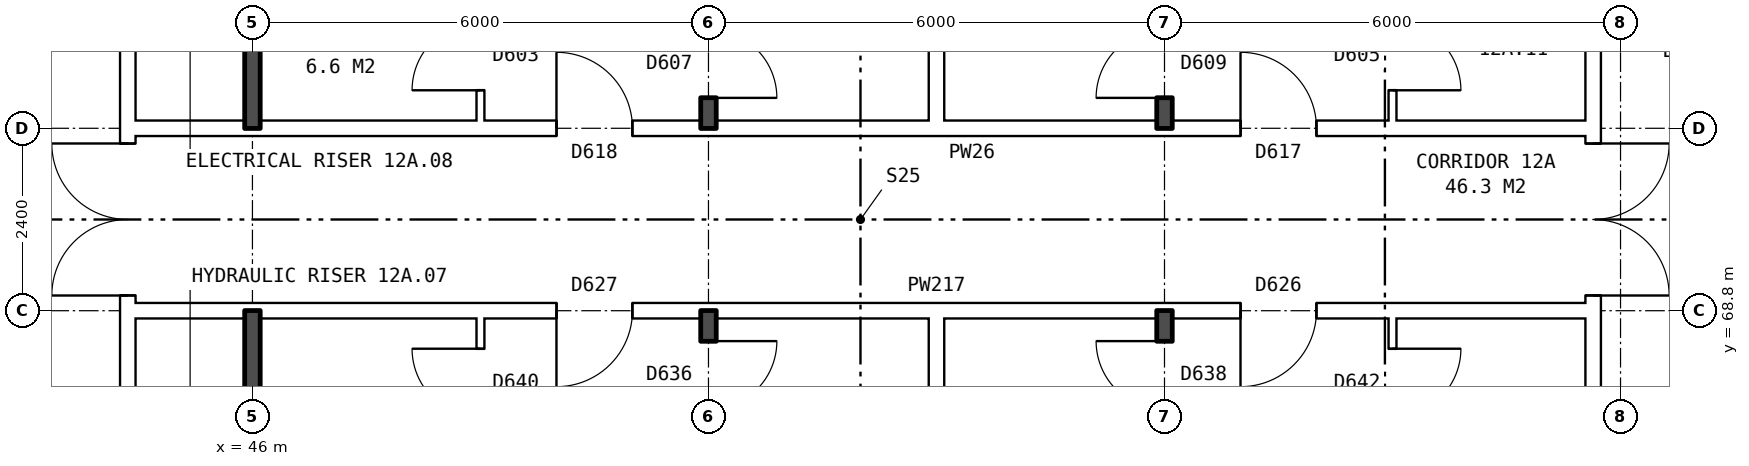
"""IFC4 building model, lengths in metres.
Left out: names, types, materials, properties, quantities, classifications, styles, units other than length and angle.
Written with IfcOpenShell. Run it as: python <this file> out.ifc"""

import sys

from ifc_helpers import new_model, si_unit, direction, frame, frame_2d, origin, place, context, subcontext, project, spatial, rectangle, extrude, element, fill, save


model = new_model("IFC4")
c1 = context("Model", 3, precision=1e-05, world=origin(), true_north=direction((0.0, 1.0)))
c2 = subcontext(c1, "Body", "Model", "MODEL_VIEW")
j1 = project(units=[si_unit("LENGTHUNIT", "METRE"), si_unit("PLANEANGLEUNIT", "RADIAN")], contexts=[c1])
p1 = place(None, origin())
s1 = spatial("IfcSite", under=j1, at=p1, CompositionType="ELEMENT")
p2 = place(p1, origin())
s2 = spatial("IfcBuilding", under=s1, at=p2, CompositionType="ELEMENT")
p3 = place(p2, frame((0.0, 0.0, 47.4)))
s3 = spatial("IfcBuildingStorey", under=s2, at=p3, CompositionType="ELEMENT", Elevation=47.4)
p4 = place(p3, frame((63.64, 63.9, 0.0), z_axis=(0.0, 0.0, 1.0), x_axis=(0.0, 1.0, 0.0)))
e1 = element("IfcWall", 1, at=p4, inside=s3, PredefinedType="PARTITIONING", context=c2, shape_type="SweptSolid", body=[
    extrude(rectangle(XDim=12.2, YDim=0.2, at=frame_2d((6.1, 0.0))), origin(), (0.0, 0.0, 1.0), 2.85),
])
p5 = place(p4, frame((5.1, 0.0, 0.0)))
e2 = element("IfcOpeningElement", 2, at=p5, cuts=e1, PredefinedType="OPENING", context=c2, shape_type="SweptSolid", body=[
    extrude(rectangle(XDim=2.0, YDim=2.1, at=frame_2d((1.0, 1.05))), frame((0.0, 0.11, 0.0), z_axis=(0.0, -1.0, 0.0), x_axis=(1.0, 0.0, 0.0)), (0.0, 0.0, 1.0), 0.22),
])
p6 = place(p3, frame((44.36, 63.9, 0.0), z_axis=(0.0, 0.0, 1.0), x_axis=(0.0, 1.0, 0.0)))
e3 = element("IfcWall", 3, at=p6, inside=s3, PredefinedType="PARTITIONING", context=c2, shape_type="SweptSolid", body=[
    extrude(rectangle(XDim=12.2, YDim=0.2, at=frame_2d((6.1, 0.0))), origin(), (0.0, 0.0, 1.0), 2.85),
])
p7 = place(p6, frame((5.1, 0.0, 0.0)))
e4 = element("IfcOpeningElement", 4, at=p7, cuts=e3, PredefinedType="OPENING", context=c2, shape_type="SweptSolid", body=[
    extrude(rectangle(XDim=2.0, YDim=2.1, at=frame_2d((1.0, 1.05))), frame((0.0, 0.11, 0.0), z_axis=(0.0, -1.0, 0.0), x_axis=(1.0, 0.0, 0.0)), (0.0, 0.0, 1.0), 0.22),
])
p8 = place(p3, frame((44.36, 68.8, 0.0), z_axis=(0.0, 0.0, 1.0), x_axis=(1.0, 0.0, 0.0)))
e5 = element("IfcWall", 5, at=p8, inside=s3, PredefinedType="PARTITIONING", context=c2, shape_type="SweptSolid", body=[
    extrude(rectangle(XDim=19.28, YDim=0.2, at=frame_2d((9.64, 0.0))), origin(), (0.0, 0.0, 1.0), 2.85),
])
p9 = place(p8, frame((14.64, 0.0, 0.0)))
e6 = element("IfcOpeningElement", 6, at=p9, cuts=e5, PredefinedType="OPENING", context=c2, shape_type="SweptSolid", body=[
    extrude(rectangle(XDim=1.0, YDim=2.1, at=frame_2d((0.5, 1.05))), frame((0.0, 0.11, 0.0), z_axis=(0.0, -1.0, 0.0), x_axis=(1.0, 0.0, 0.0)), (0.0, 0.0, 1.0), 0.22),
])
p10 = place(p8, frame((5.64, 0.0, 0.0)))
e7 = element("IfcOpeningElement", 7, at=p10, cuts=e5, PredefinedType="OPENING", context=c2, shape_type="SweptSolid", body=[
    extrude(rectangle(XDim=1.0, YDim=2.1, at=frame_2d((0.5, 1.05))), frame((0.0, 0.11, 0.0), z_axis=(0.0, -1.0, 0.0), x_axis=(1.0, 0.0, 0.0)), (0.0, 0.0, 1.0), 0.22),
])
p11 = place(p3, frame((44.36, 71.2, 0.0), z_axis=(0.0, 0.0, 1.0), x_axis=(1.0, 0.0, 0.0)))
e8 = element("IfcWall", 8, at=p11, inside=s3, PredefinedType="PARTITIONING", context=c2, shape_type="SweptSolid", body=[
    extrude(rectangle(XDim=19.28, YDim=0.2, at=frame_2d((9.64, 0.0))), origin(), (0.0, 0.0, 1.0), 2.85),
])
p12 = place(p11, frame((14.64, 0.0, 0.0)))
e9 = element("IfcOpeningElement", 9, at=p12, cuts=e8, PredefinedType="OPENING", context=c2, shape_type="SweptSolid", body=[
    extrude(rectangle(XDim=1.0, YDim=2.1, at=frame_2d((0.5, 1.05))), frame((0.0, 0.11, 0.0), z_axis=(0.0, -1.0, 0.0), x_axis=(1.0, 0.0, 0.0)), (0.0, 0.0, 1.0), 0.22),
])
p13 = place(p11, frame((5.64, 0.0, 0.0)))
e10 = element("IfcOpeningElement", 10, at=p13, cuts=e8, PredefinedType="OPENING", context=c2, shape_type="SweptSolid", body=[
    extrude(rectangle(XDim=1.0, YDim=2.1, at=frame_2d((0.5, 1.05))), frame((0.0, 0.11, 0.0), z_axis=(0.0, -1.0, 0.0), x_axis=(1.0, 0.0, 0.0)), (0.0, 0.0, 1.0), 0.22),
])
for number, where, z_axis, x_axis in (
    (11, (46.0, 63.8, 0.0), (0.0, 0.0, 1.0), (0.0, 1.0, 0.0)),
    (12, (46.0, 71.2, 0.0), (0.0, 0.0, 1.0), (0.0, 1.0, 0.0)),
):
    element("IfcWall", number, at=place(p3, frame(where, z_axis=z_axis, x_axis=x_axis)), inside=s3, PredefinedType="SOLIDWALL", context=c2, shape_type="SweptSolid", body=[
        extrude(rectangle(XDim=5.0, YDim=0.2, at=frame_2d((2.5, 0.0))), origin(), (0.0, 0.0, 1.0), 2.85),
    ])
p14 = place(p3, frame((49.0, 54.36, 0.0), z_axis=(0.0, 0.0, 1.0), x_axis=(0.0, 1.0, 0.0)))
e13 = element("IfcWall", 13, at=p14, inside=s3, PredefinedType="PARTITIONING", context=c2, shape_type="SweptSolid", body=[
    extrude(rectangle(XDim=14.34, YDim=0.1, at=frame_2d((7.17, 0.0))), origin(), (0.0, 0.0, 1.0), 2.85),
])
p15 = place(p14, frame((6.7, 0.0, 0.0)))
e14 = element("IfcOpeningElement", 14, at=p15, cuts=e13, PredefinedType="OPENING", context=c2, shape_type="SweptSolid", body=[
    extrude(rectangle(XDim=0.9, YDim=2.1, at=frame_2d((0.45, 1.05))), frame((0.0, 0.06, 0.0), z_axis=(0.0, -1.0, 0.0), x_axis=(1.0, 0.0, 0.0)), (0.0, 0.0, 1.0), 0.12),
])
p16 = place(p14, frame((13.04, 0.0, 0.0)))
e15 = element("IfcOpeningElement", 15, at=p16, cuts=e13, PredefinedType="OPENING", context=c2, shape_type="SweptSolid", body=[
    extrude(rectangle(XDim=0.9, YDim=2.1, at=frame_2d((0.45, 1.05))), frame((0.0, 0.06, 0.0), z_axis=(0.0, -1.0, 0.0), x_axis=(1.0, 0.0, 0.0)), (0.0, 0.0, 1.0), 0.12),
])
p17 = place(p3, frame((49.0, 71.3, 0.0), z_axis=(0.0, 0.0, 1.0), x_axis=(0.0, 1.0, 0.0)))
e16 = element("IfcWall", 16, at=p17, inside=s3, PredefinedType="PARTITIONING", context=c2, shape_type="SweptSolid", body=[
    extrude(rectangle(XDim=14.34, YDim=0.1, at=frame_2d((7.17, 0.0))), origin(), (0.0, 0.0, 1.0), 2.85),
])
p18 = place(p17, frame((6.74, 0.0, 0.0)))
e17 = element("IfcOpeningElement", 17, at=p18, cuts=e16, PredefinedType="OPENING", context=c2, shape_type="SweptSolid", body=[
    extrude(rectangle(XDim=0.9, YDim=2.1, at=frame_2d((0.45, 1.05))), frame((0.0, 0.06, 0.0), z_axis=(0.0, -1.0, 0.0), x_axis=(1.0, 0.0, 0.0)), (0.0, 0.0, 1.0), 0.12),
])
p19 = place(p17, frame((0.4, 0.0, 0.0)))
e18 = element("IfcOpeningElement", 18, at=p19, cuts=e16, PredefinedType="OPENING", context=c2, shape_type="SweptSolid", body=[
    extrude(rectangle(XDim=0.9, YDim=2.1, at=frame_2d((0.45, 1.05))), frame((0.0, 0.06, 0.0), z_axis=(0.0, -1.0, 0.0), x_axis=(1.0, 0.0, 0.0)), (0.0, 0.0, 1.0), 0.12),
])
p20 = place(p3, frame((52.0, 54.36, 0.0), z_axis=(0.0, 0.0, 1.0), x_axis=(0.0, 1.0, 0.0)))
e19 = element("IfcWall", 19, at=p20, inside=s3, PredefinedType="SOLIDWALL", context=c2, shape_type="SweptSolid", body=[
    extrude(rectangle(XDim=14.44, YDim=0.2, at=frame_2d((7.22, 0.0))), origin(), (0.0, 0.0, 1.0), 2.85),
])
p21 = place(p20, frame((6.7, 0.0, 0.0)))
e20 = element("IfcOpeningElement", 20, at=p21, cuts=e19, PredefinedType="OPENING", context=c2, shape_type="SweptSolid", body=[
    extrude(rectangle(XDim=0.9, YDim=2.1, at=frame_2d((0.45, 1.05))), frame((0.0, 0.11, 0.0), z_axis=(0.0, -1.0, 0.0), x_axis=(1.0, 0.0, 0.0)), (0.0, 0.0, 1.0), 0.22),
])
p22 = place(p20, frame((13.14, 0.0, 0.0)))
e21 = element("IfcOpeningElement", 21, at=p22, cuts=e19, PredefinedType="OPENING", context=c2, shape_type="SweptSolid", body=[
    extrude(rectangle(XDim=0.9, YDim=2.1, at=frame_2d((0.45, 1.05))), frame((0.0, 0.11, 0.0), z_axis=(0.0, -1.0, 0.0), x_axis=(1.0, 0.0, 0.0)), (0.0, 0.0, 1.0), 0.22),
])
p23 = place(p3, frame((52.0, 71.2, 0.0), z_axis=(0.0, 0.0, 1.0), x_axis=(0.0, 1.0, 0.0)))
e22 = element("IfcWall", 22, at=p23, inside=s3, PredefinedType="SOLIDWALL", context=c2, shape_type="SweptSolid", body=[
    extrude(rectangle(XDim=14.44, YDim=0.2, at=frame_2d((7.22, 0.0))), origin(), (0.0, 0.0, 1.0), 2.85),
])
p24 = place(p23, frame((6.84, 0.0, 0.0)))
e23 = element("IfcOpeningElement", 23, at=p24, cuts=e22, PredefinedType="OPENING", context=c2, shape_type="SweptSolid", body=[
    extrude(rectangle(XDim=0.9, YDim=2.1, at=frame_2d((0.45, 1.05))), frame((0.0, 0.11, 0.0), z_axis=(0.0, -1.0, 0.0), x_axis=(1.0, 0.0, 0.0)), (0.0, 0.0, 1.0), 0.22),
])
p25 = place(p23, frame((0.4, 0.0, 0.0)))
e24 = element("IfcOpeningElement", 24, at=p25, cuts=e22, PredefinedType="OPENING", context=c2, shape_type="SweptSolid", body=[
    extrude(rectangle(XDim=0.9, YDim=2.1, at=frame_2d((0.45, 1.05))), frame((0.0, 0.11, 0.0), z_axis=(0.0, -1.0, 0.0), x_axis=(1.0, 0.0, 0.0)), (0.0, 0.0, 1.0), 0.22),
])
for number, where, z_axis, x_axis in (
    (25, (55.0, 54.36, 0.0), (0.0, 0.0, 1.0), (0.0, 1.0, 0.0)),
    (26, (55.0, 71.3, 0.0), (0.0, 0.0, 1.0), (0.0, 1.0, 0.0)),
):
    element("IfcWall", number, at=place(p3, frame(where, z_axis=z_axis, x_axis=x_axis)), inside=s3, PredefinedType="PARTITIONING", context=c2, shape_type="SweptSolid", body=[
        extrude(rectangle(XDim=14.34, YDim=0.2, at=frame_2d((7.17, 0.0))), origin(), (0.0, 0.0, 1.0), 2.85),
    ])
p26 = place(p3, frame((58.0, 54.36, 0.0), z_axis=(0.0, 0.0, 1.0), x_axis=(0.0, 1.0, 0.0)))
e27 = element("IfcWall", 27, at=p26, inside=s3, PredefinedType="SOLIDWALL", context=c2, shape_type="SweptSolid", body=[
    extrude(rectangle(XDim=14.44, YDim=0.2, at=frame_2d((7.22, 0.0))), origin(), (0.0, 0.0, 1.0), 2.85),
])
p27 = place(p26, frame((6.7, 0.0, 0.0)))
e28 = element("IfcOpeningElement", 28, at=p27, cuts=e27, PredefinedType="OPENING", context=c2, shape_type="SweptSolid", body=[
    extrude(rectangle(XDim=0.9, YDim=2.1, at=frame_2d((0.45, 1.05))), frame((0.0, 0.11, 0.0), z_axis=(0.0, -1.0, 0.0), x_axis=(1.0, 0.0, 0.0)), (0.0, 0.0, 1.0), 0.22),
])
p28 = place(p26, frame((13.14, 0.0, 0.0)))
e29 = element("IfcOpeningElement", 29, at=p28, cuts=e27, PredefinedType="OPENING", context=c2, shape_type="SweptSolid", body=[
    extrude(rectangle(XDim=0.9, YDim=2.1, at=frame_2d((0.45, 1.05))), frame((0.0, 0.11, 0.0), z_axis=(0.0, -1.0, 0.0), x_axis=(1.0, 0.0, 0.0)), (0.0, 0.0, 1.0), 0.22),
])
p29 = place(p3, frame((58.0, 71.2, 0.0), z_axis=(0.0, 0.0, 1.0), x_axis=(0.0, 1.0, 0.0)))
e30 = element("IfcWall", 30, at=p29, inside=s3, PredefinedType="SOLIDWALL", context=c2, shape_type="SweptSolid", body=[
    extrude(rectangle(XDim=14.44, YDim=0.2, at=frame_2d((7.22, 0.0))), origin(), (0.0, 0.0, 1.0), 2.85),
])
p30 = place(p29, frame((8.04, 0.0, 0.0)))
e31 = element("IfcOpeningElement", 31, at=p30, cuts=e30, PredefinedType="OPENING", context=c2, shape_type="SweptSolid", body=[
    extrude(rectangle(XDim=0.9, YDim=2.1, at=frame_2d((0.45, 1.05))), frame((0.0, 0.11, 0.0), z_axis=(0.0, -1.0, 0.0), x_axis=(1.0, 0.0, 0.0)), (0.0, 0.0, 1.0), 0.22),
])
p31 = place(p29, frame((0.4, 0.0, 0.0)))
e32 = element("IfcOpeningElement", 32, at=p31, cuts=e30, PredefinedType="OPENING", context=c2, shape_type="SweptSolid", body=[
    extrude(rectangle(XDim=0.9, YDim=2.1, at=frame_2d((0.45, 1.05))), frame((0.0, 0.11, 0.0), z_axis=(0.0, -1.0, 0.0), x_axis=(1.0, 0.0, 0.0)), (0.0, 0.0, 1.0), 0.22),
])
p32 = place(p3, frame((61.0, 54.36, 0.0), z_axis=(0.0, 0.0, 1.0), x_axis=(0.0, 1.0, 0.0)))
e33 = element("IfcWall", 33, at=p32, inside=s3, PredefinedType="PARTITIONING", context=c2, shape_type="SweptSolid", body=[
    extrude(rectangle(XDim=14.34, YDim=0.1, at=frame_2d((7.17, 0.0))), origin(), (0.0, 0.0, 1.0), 2.85),
])
p33 = place(p32, frame((6.7, 0.0, 0.0)))
e34 = element("IfcOpeningElement", 34, at=p33, cuts=e33, PredefinedType="OPENING", context=c2, shape_type="SweptSolid", body=[
    extrude(rectangle(XDim=0.9, YDim=2.1, at=frame_2d((0.45, 1.05))), frame((0.0, 0.06, 0.0), z_axis=(0.0, -1.0, 0.0), x_axis=(1.0, 0.0, 0.0)), (0.0, 0.0, 1.0), 0.12),
])
p34 = place(p32, frame((13.04, 0.0, 0.0)))
e35 = element("IfcOpeningElement", 35, at=p34, cuts=e33, PredefinedType="OPENING", context=c2, shape_type="SweptSolid", body=[
    extrude(rectangle(XDim=0.9, YDim=2.1, at=frame_2d((0.45, 1.05))), frame((0.0, 0.06, 0.0), z_axis=(0.0, -1.0, 0.0), x_axis=(1.0, 0.0, 0.0)), (0.0, 0.0, 1.0), 0.12),
])
p35 = place(p3, frame((61.0, 71.3, 0.0), z_axis=(0.0, 0.0, 1.0), x_axis=(0.0, 1.0, 0.0)))
e36 = element("IfcWall", 36, at=p35, inside=s3, PredefinedType="PARTITIONING", context=c2, shape_type="SweptSolid", body=[
    extrude(rectangle(XDim=14.34, YDim=0.1, at=frame_2d((7.17, 0.0))), origin(), (0.0, 0.0, 1.0), 2.85),
])
p36 = place(p35, frame((7.94, 0.0, 0.0)))
e37 = element("IfcOpeningElement", 37, at=p36, cuts=e36, PredefinedType="OPENING", context=c2, shape_type="SweptSolid", body=[
    extrude(rectangle(XDim=0.9, YDim=2.1, at=frame_2d((0.45, 1.05))), frame((0.0, 0.06, 0.0), z_axis=(0.0, -1.0, 0.0), x_axis=(1.0, 0.0, 0.0)), (0.0, 0.0, 1.0), 0.12),
])
p37 = place(p35, frame((0.4, 0.0, 0.0)))
e38 = element("IfcOpeningElement", 38, at=p37, cuts=e36, PredefinedType="OPENING", context=c2, shape_type="SweptSolid", body=[
    extrude(rectangle(XDim=0.9, YDim=2.1, at=frame_2d((0.45, 1.05))), frame((0.0, 0.06, 0.0), z_axis=(0.0, -1.0, 0.0), x_axis=(1.0, 0.0, 0.0)), (0.0, 0.0, 1.0), 0.12),
])
p38 = place(p5, frame((2.0, 0.0, 0.0), z_axis=(0.0, 0.0, 1.0), x_axis=(-1.0, 0.0, 0.0)))
e39 = element("IfcDoor", 39, at=p38, inside=s3, OperationType="DOUBLE_DOOR_SINGLE_SWING", PredefinedType="DOOR", context=c2, shape_type="SweptSolid", body=[
    extrude(rectangle(XDim=2.0, YDim=2.1, at=frame_2d((1.0, 1.05))), frame((0.0, 0.025, 0.0), z_axis=(0.0, -1.0, 0.0), x_axis=(1.0, 0.0, 0.0)), (0.0, 0.0, 1.0), 0.05),
])
fill(e2, e39)
p39 = place(p7, origin())
e40 = element("IfcDoor", 40, at=p39, inside=s3, OperationType="DOUBLE_DOOR_SINGLE_SWING", PredefinedType="DOOR", context=c2, shape_type="SweptSolid", body=[
    extrude(rectangle(XDim=2.0, YDim=2.1, at=frame_2d((1.0, 1.05))), frame((0.0, 0.025, 0.0), z_axis=(0.0, -1.0, 0.0), x_axis=(1.0, 0.0, 0.0)), (0.0, 0.0, 1.0), 0.05),
])
fill(e4, e40)
p40 = place(p9, frame((1.0, 0.0, 0.0), z_axis=(0.0, 0.0, 1.0), x_axis=(-1.0, 0.0, 0.0)))
e41 = element("IfcDoor", 41, at=p40, inside=s3, OperationType="SINGLE_SWING_RIGHT", PredefinedType="DOOR", context=c2, shape_type="SweptSolid", body=[
    extrude(rectangle(XDim=1.0, YDim=2.1, at=frame_2d((0.5, 1.05))), frame((0.0, 0.025, 0.0), z_axis=(0.0, -1.0, 0.0), x_axis=(1.0, 0.0, 0.0)), (0.0, 0.0, 1.0), 0.05),
])
fill(e6, e41)
p41 = place(p34, frame((0.9, 0.0, 0.0), z_axis=(0.0, 0.0, 1.0), x_axis=(-1.0, 0.0, 0.0)))
e42 = element("IfcDoor", 42, at=p41, inside=s3, OperationType="SINGLE_SWING_LEFT", PredefinedType="DOOR", context=c2, shape_type="SweptSolid", body=[
    extrude(rectangle(XDim=0.9, YDim=2.1, at=frame_2d((0.45, 1.05))), frame((0.0, 0.025, 0.0), z_axis=(0.0, -1.0, 0.0), x_axis=(1.0, 0.0, 0.0)), (0.0, 0.0, 1.0), 0.05),
])
fill(e35, e42)
p42 = place(p28, origin())
e43 = element("IfcDoor", 43, at=p42, inside=s3, OperationType="SINGLE_SWING_RIGHT", PredefinedType="DOOR", context=c2, shape_type="SweptSolid", body=[
    extrude(rectangle(XDim=0.9, YDim=2.1, at=frame_2d((0.45, 1.05))), frame((0.0, 0.025, 0.0), z_axis=(0.0, -1.0, 0.0), x_axis=(1.0, 0.0, 0.0)), (0.0, 0.0, 1.0), 0.05),
])
fill(e29, e43)
p43 = place(p10, frame((1.0, 0.0, 0.0), z_axis=(0.0, 0.0, 1.0), x_axis=(-1.0, 0.0, 0.0)))
e44 = element("IfcDoor", 44, at=p43, inside=s3, OperationType="SINGLE_SWING_RIGHT", PredefinedType="DOOR", context=c2, shape_type="SweptSolid", body=[
    extrude(rectangle(XDim=1.0, YDim=2.1, at=frame_2d((0.5, 1.05))), frame((0.0, 0.025, 0.0), z_axis=(0.0, -1.0, 0.0), x_axis=(1.0, 0.0, 0.0)), (0.0, 0.0, 1.0), 0.05),
])
fill(e7, e44)
p44 = place(p22, frame((0.9, 0.0, 0.0), z_axis=(0.0, 0.0, 1.0), x_axis=(-1.0, 0.0, 0.0)))
e45 = element("IfcDoor", 45, at=p44, inside=s3, OperationType="SINGLE_SWING_LEFT", PredefinedType="DOOR", context=c2, shape_type="SweptSolid", body=[
    extrude(rectangle(XDim=0.9, YDim=2.1, at=frame_2d((0.45, 1.05))), frame((0.0, 0.025, 0.0), z_axis=(0.0, -1.0, 0.0), x_axis=(1.0, 0.0, 0.0)), (0.0, 0.0, 1.0), 0.05),
])
fill(e21, e45)
p45 = place(p16, origin())
e46 = element("IfcDoor", 46, at=p45, inside=s3, OperationType="SINGLE_SWING_RIGHT", PredefinedType="DOOR", context=c2, shape_type="SweptSolid", body=[
    extrude(rectangle(XDim=0.9, YDim=2.1, at=frame_2d((0.45, 1.05))), frame((0.0, 0.025, 0.0), z_axis=(0.0, -1.0, 0.0), x_axis=(1.0, 0.0, 0.0)), (0.0, 0.0, 1.0), 0.05),
])
fill(e15, e46)
p46 = place(p12, origin())
e47 = element("IfcDoor", 47, at=p46, inside=s3, OperationType="SINGLE_SWING_LEFT", PredefinedType="DOOR", context=c2, shape_type="SweptSolid", body=[
    extrude(rectangle(XDim=1.0, YDim=2.1, at=frame_2d((0.5, 1.05))), frame((0.0, 0.025, 0.0), z_axis=(0.0, -1.0, 0.0), x_axis=(1.0, 0.0, 0.0)), (0.0, 0.0, 1.0), 0.05),
])
fill(e9, e47)
p47 = place(p37, frame((0.9, 0.0, 0.0), z_axis=(0.0, 0.0, 1.0), x_axis=(-1.0, 0.0, 0.0)))
e48 = element("IfcDoor", 48, at=p47, inside=s3, OperationType="SINGLE_SWING_RIGHT", PredefinedType="DOOR", context=c2, shape_type="SweptSolid", body=[
    extrude(rectangle(XDim=0.9, YDim=2.1, at=frame_2d((0.45, 1.05))), frame((0.0, 0.025, 0.0), z_axis=(0.0, -1.0, 0.0), x_axis=(1.0, 0.0, 0.0)), (0.0, 0.0, 1.0), 0.05),
])
fill(e38, e48)
p48 = place(p31, origin())
e49 = element("IfcDoor", 49, at=p48, inside=s3, OperationType="SINGLE_SWING_LEFT", PredefinedType="DOOR", context=c2, shape_type="SweptSolid", body=[
    extrude(rectangle(XDim=0.9, YDim=2.1, at=frame_2d((0.45, 1.05))), frame((0.0, 0.025, 0.0), z_axis=(0.0, -1.0, 0.0), x_axis=(1.0, 0.0, 0.0)), (0.0, 0.0, 1.0), 0.05),
])
fill(e32, e49)
p49 = place(p13, origin())
e50 = element("IfcDoor", 50, at=p49, inside=s3, OperationType="SINGLE_SWING_LEFT", PredefinedType="DOOR", context=c2, shape_type="SweptSolid", body=[
    extrude(rectangle(XDim=1.0, YDim=2.1, at=frame_2d((0.5, 1.05))), frame((0.0, 0.025, 0.0), z_axis=(0.0, -1.0, 0.0), x_axis=(1.0, 0.0, 0.0)), (0.0, 0.0, 1.0), 0.05),
])
fill(e10, e50)
p50 = place(p25, frame((0.9, 0.0, 0.0), z_axis=(0.0, 0.0, 1.0), x_axis=(-1.0, 0.0, 0.0)))
e51 = element("IfcDoor", 51, at=p50, inside=s3, OperationType="SINGLE_SWING_RIGHT", PredefinedType="DOOR", context=c2, shape_type="SweptSolid", body=[
    extrude(rectangle(XDim=0.9, YDim=2.1, at=frame_2d((0.45, 1.05))), frame((0.0, 0.025, 0.0), z_axis=(0.0, -1.0, 0.0), x_axis=(1.0, 0.0, 0.0)), (0.0, 0.0, 1.0), 0.05),
])
fill(e24, e51)
p51 = place(p19, origin())
e52 = element("IfcDoor", 52, at=p51, inside=s3, OperationType="SINGLE_SWING_LEFT", PredefinedType="DOOR", context=c2, shape_type="SweptSolid", body=[
    extrude(rectangle(XDim=0.9, YDim=2.1, at=frame_2d((0.45, 1.05))), frame((0.0, 0.025, 0.0), z_axis=(0.0, -1.0, 0.0), x_axis=(1.0, 0.0, 0.0)), (0.0, 0.0, 1.0), 0.05),
])
fill(e18, e52)
save(model, sys.argv[1])
